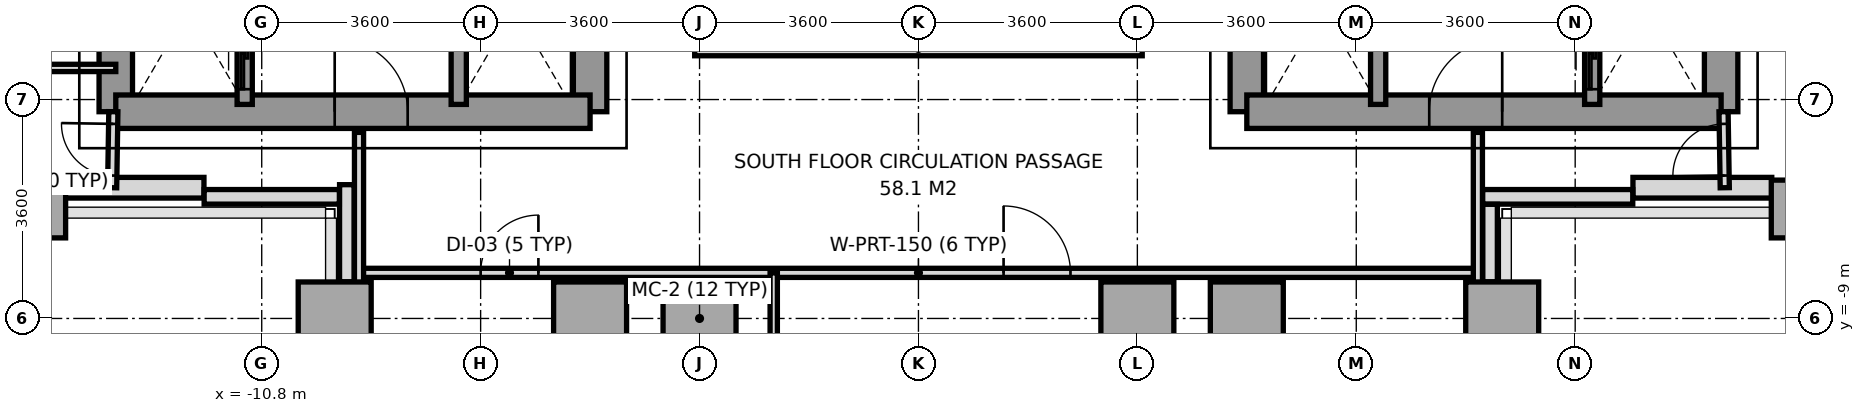
"""IFC4 building model, lengths in metres.
Left out: names, types, materials, properties, quantities, classifications, styles, units other than length and angle.
Written with IfcOpenShell. Run it as: python <this file> out.ifc"""

import sys

from ifc_helpers import new_model, si_unit, direction, frame, frame_2d, origin, origin_2d, place, context, subcontext, project, spatial, rectangle, extrude, source, transform, mapped, element, fill, save


model = new_model("IFC4")
c1 = context("Model", 3, precision=1e-05, world=origin(), true_north=direction((0.0, 1.0)))
c2 = subcontext(c1, "Body", "Model", "MODEL_VIEW")
j1 = project(units=[si_unit("LENGTHUNIT", "METRE"), si_unit("PLANEANGLEUNIT", "RADIAN")], contexts=[c1])
p1 = place(None, origin())
s1 = spatial("IfcSite", under=j1, at=p1, CompositionType="ELEMENT")
p2 = place(p1, origin())
s2 = spatial("IfcBuilding", under=s1, at=p2, CompositionType="ELEMENT")
p3 = place(p2, frame((0.0, 0.0, 34.0)))
s3 = spatial("IfcBuildingStorey", under=s2, at=p3, CompositionType="ELEMENT", Elevation=34.0)
m1 = source(origin(), c2, "Body", "SweptSolid", [
    extrude(rectangle(XDim=0.75, YDim=0.95, at=origin_2d()), origin(), (0.0, 0.0, 1.0), 3.2),
])
p4 = place(p3, frame((-14.4, -7.2, 0.0), z_axis=(0.0, 0.0, 1.0), x_axis=(1.0, 0.0, 0.0)))
e1 = element("IfcColumn", 1, at=p4, inside=s3, PredefinedType="COLUMN", context=c2, shape_type="MappedRepresentation", body=[
    mapped(m1, transform((0.0, 0.0, 0.0), x_axis=(1.0, 0.0, 0.0), y_axis=(0.0, 1.0, 0.0), z_axis=(0.0, 0.0, 1.0), scale=1.0)),
])
m2 = source(origin(), c2, "Body", "SweptSolid", [
    extrude(rectangle(XDim=1.2, YDim=1.2, at=origin_2d()), origin(), (0.0, 0.0, 1.0), 3.2),
])
for number, where, z_axis, x_axis in (
    (2, (-9.6, -9.0, 0.0), (0.0, 0.0, 1.0), (1.0, 0.0, 0.0)),
    (3, (-5.4, -9.0, 0.0), (0.0, 0.0, 1.0), (1.0, 0.0, 0.0)),
    (4, (-3.6, -9.0, 0.0), (0.0, 0.0, 1.0), (1.0, 0.0, 0.0)),
    (5, (3.6, -9.0, 0.0), (0.0, 0.0, 1.0), (1.0, 0.0, 0.0)),
    (6, (5.4, -9.0, 0.0), (0.0, 0.0, 1.0), (1.0, 0.0, 0.0)),
    (7, (9.6, -9.0, 0.0), (0.0, 0.0, 1.0), (1.0, 0.0, 0.0)),
):
    element("IfcColumn", number, at=place(p3, frame(where, z_axis=z_axis, x_axis=x_axis)), inside=s3, PredefinedType="COLUMN", context=c2, shape_type="MappedRepresentation", body=[
        mapped(m2, transform((0.0, 0.0, 0.0), x_axis=(1.0, 0.0, 0.0), y_axis=(0.0, 1.0, 0.0), z_axis=(0.0, 0.0, 1.0), scale=1.0)),
    ])
p5 = place(p3, frame((14.4, -7.2, 0.0), z_axis=(0.0, 0.0, 1.0), x_axis=(1.0, 0.0, 0.0)))
e8 = element("IfcColumn", 8, at=p5, inside=s3, PredefinedType="COLUMN", context=c2, shape_type="MappedRepresentation", body=[
    mapped(m1, transform((0.0, 0.0, 0.0), x_axis=(1.0, 0.0, 0.0), y_axis=(0.0, 1.0, 0.0), z_axis=(0.0, 0.0, 1.0), scale=1.0)),
])
for number, where, z_axis, x_axis in (
    (9, (-14.033, -6.85, 0.0), (0.0, 0.0, 1.0), (1.0, 0.0, 0.0)),
    (10, (11.75, -6.85, 0.0), (0.0, 0.0, 1.0), (1.0, 0.0, 0.0)),
):
    element("IfcWall", number, at=place(p3, frame(where, z_axis=z_axis, x_axis=x_axis)), inside=s3, PredefinedType="SOLIDWALL", context=c2, shape_type="SweptSolid", body=[
        extrude(rectangle(XDim=2.283, YDim=0.34, at=frame_2d((1.142, 0.0))), origin(), (0.0, 0.0, 1.0), 3.2),
    ])
p6 = place(p3, frame((11.747, -7.0, 0.0), z_axis=(0.0, 0.0, 1.0), x_axis=(-1.0, 0.0, 0.0)))
e11 = element("IfcWall", 11, at=p6, inside=s3, PredefinedType="PARAPET", context=c2, shape_type="SweptSolid", body=[
    extrude(rectangle(XDim=2.469, YDim=0.24, at=frame_2d((1.234, 0.0))), origin(), (0.0, 0.0, 1.0), 1.15),
])
p7 = place(p3, frame((9.4, -7.123, 0.0), z_axis=(0.0, 0.0, 1.0), x_axis=(0.0, -1.0, 0.0)))
e12 = element("IfcWall", 12, at=p7, inside=s3, PredefinedType="PARAPET", context=c2, shape_type="SweptSolid", body=[
    extrude(rectangle(XDim=1.274, YDim=0.24, at=frame_2d((0.637, 0.0))), origin(), (0.0, 0.0, 1.0), 1.15),
])
p8 = place(p3, frame((-9.4, -8.397, 0.0), z_axis=(0.0, 0.0, 1.0), x_axis=(0.0, 1.0, 0.0)))
e13 = element("IfcWall", 13, at=p8, inside=s3, PredefinedType="PARAPET", context=c2, shape_type="SweptSolid", body=[
    extrude(rectangle(XDim=1.597, YDim=0.24, at=frame_2d((0.798, 0.0))), origin(), (0.0, 0.0, 1.0), 1.15),
])
p9 = place(p3, frame((-9.523, -7.0, 0.0), z_axis=(0.0, 0.0, 1.0), x_axis=(-1.0, 0.0, 0.0)))
e14 = element("IfcWall", 14, at=p9, inside=s3, PredefinedType="PARAPET", context=c2, shape_type="SweptSolid", body=[
    extrude(rectangle(XDim=2.224, YDim=0.24, at=frame_2d((1.112, 0.0))), origin(), (0.0, 0.0, 1.0), 1.15),
])
p10 = place(p3, frame((-13.2, -5.6, 0.0), z_axis=(0.0, 0.0, 1.0), x_axis=(0.0, 1.0, 0.0)))
e15 = element("IfcWall", 15, at=p10, inside=s3, PredefinedType="SHEAR", context=c2, shape_type="SweptSolid", body=[
    extrude(rectangle(XDim=11.2, YDim=0.55, at=frame_2d((5.6, 0.0))), origin(), (0.0, 0.0, 1.0), 3.2),
])
p11 = place(p3, frame((-5.4, -5.6, 0.0), z_axis=(0.0, 0.0, 1.0), x_axis=(0.0, 1.0, 0.0)))
e16 = element("IfcWall", 16, at=p11, inside=s3, PredefinedType="SHEAR", context=c2, shape_type="SweptSolid", body=[
    extrude(rectangle(XDim=12.5, YDim=0.55, at=frame_2d((6.25, 0.0))), origin(), (0.0, 0.0, 1.0), 3.2),
])
p12 = place(p11, frame((4.55, 0.0, 0.0)))
e17 = element("IfcOpeningElement", 17, at=p12, cuts=e16, PredefinedType="OPENING", context=c2, shape_type="SweptSolid", body=[
    extrude(rectangle(XDim=1.2, YDim=2.2, at=frame_2d((0.6, 1.1))), frame((0.0, 0.285, 0.0), z_axis=(0.0, -1.0, 0.0), x_axis=(1.0, 0.0, 0.0)), (0.0, 0.0, 1.0), 0.57),
])
p13 = place(p11, frame((6.86, 0.0, 0.0)))
e18 = element("IfcOpeningElement", 18, at=p13, cuts=e16, PredefinedType="OPENING", context=c2, shape_type="SweptSolid", body=[
    extrude(rectangle(XDim=0.8, YDim=2.1, at=frame_2d((0.4, 1.05))), frame((0.0, 0.285, 0.0), z_axis=(0.0, -1.0, 0.0), x_axis=(1.0, 0.0, 0.0)), (0.0, 0.0, 1.0), 0.57),
])
p14 = place(p3, frame((-13.2, -5.6, 0.0), z_axis=(0.0, 0.0, 1.0), x_axis=(1.0, 0.0, 0.0)))
e19 = element("IfcWall", 19, at=p14, inside=s3, PredefinedType="SHEAR", context=c2, shape_type="SweptSolid", body=[
    extrude(rectangle(XDim=7.8, YDim=0.55, at=frame_2d((3.9, 0.0))), origin(), (0.0, 0.0, 1.0), 3.2),
])
p15 = place(p14, frame((3.6, 0.0, 0.0)))
e20 = element("IfcOpeningElement", 20, at=p15, cuts=e19, PredefinedType="OPENING", context=c2, shape_type="SweptSolid", body=[
    extrude(rectangle(XDim=1.2, YDim=2.2, at=frame_2d((0.6, 1.1))), frame((0.0, 0.285, 0.0), z_axis=(0.0, -1.0, 0.0), x_axis=(1.0, 0.0, 0.0)), (0.0, 0.0, 1.0), 0.57),
])
p16 = place(p3, frame((13.2, -5.6, 0.0), z_axis=(0.0, 0.0, 1.0), x_axis=(0.0, 1.0, 0.0)))
e21 = element("IfcWall", 21, at=p16, inside=s3, PredefinedType="SHEAR", context=c2, shape_type="SweptSolid", body=[
    extrude(rectangle(XDim=11.2, YDim=0.55, at=frame_2d((5.6, 0.0))), origin(), (0.0, 0.0, 1.0), 3.2),
])
p17 = place(p3, frame((5.4, -5.6, 0.0), z_axis=(0.0, 0.0, 1.0), x_axis=(0.0, 1.0, 0.0)))
e22 = element("IfcWall", 22, at=p17, inside=s3, PredefinedType="SHEAR", context=c2, shape_type="SweptSolid", body=[
    extrude(rectangle(XDim=12.5, YDim=0.55, at=frame_2d((6.25, 0.0))), origin(), (0.0, 0.0, 1.0), 3.2),
])
p18 = place(p17, frame((4.55, 0.0, 0.0)))
e23 = element("IfcOpeningElement", 23, at=p18, cuts=e22, PredefinedType="OPENING", context=c2, shape_type="SweptSolid", body=[
    extrude(rectangle(XDim=1.2, YDim=2.2, at=frame_2d((0.6, 1.1))), frame((0.0, 0.285, 0.0), z_axis=(0.0, -1.0, 0.0), x_axis=(1.0, 0.0, 0.0)), (0.0, 0.0, 1.0), 0.57),
])
p19 = place(p17, frame((6.86, 0.0, 0.0)))
e24 = element("IfcOpeningElement", 24, at=p19, cuts=e22, PredefinedType="OPENING", context=c2, shape_type="SweptSolid", body=[
    extrude(rectangle(XDim=0.8, YDim=2.1, at=frame_2d((0.4, 1.05))), frame((0.0, 0.285, 0.0), z_axis=(0.0, -1.0, 0.0), x_axis=(1.0, 0.0, 0.0)), (0.0, 0.0, 1.0), 0.57),
])
p20 = place(p3, frame((5.4, -5.6, 0.0), z_axis=(0.0, 0.0, 1.0), x_axis=(1.0, 0.0, 0.0)))
e25 = element("IfcWall", 25, at=p20, inside=s3, PredefinedType="SHEAR", context=c2, shape_type="SweptSolid", body=[
    extrude(rectangle(XDim=7.8, YDim=0.55, at=frame_2d((3.9, 0.0))), origin(), (0.0, 0.0, 1.0), 3.2),
])
p21 = place(p20, frame((3.0, 0.0, 0.0)))
e26 = element("IfcOpeningElement", 26, at=p21, cuts=e25, PredefinedType="OPENING", context=c2, shape_type="SweptSolid", body=[
    extrude(rectangle(XDim=1.2, YDim=2.2, at=frame_2d((0.6, 1.1))), frame((0.0, 0.285, 0.0), z_axis=(0.0, -1.0, 0.0), x_axis=(1.0, 0.0, 0.0)), (0.0, 0.0, 1.0), 0.57),
])
p22 = place(p3, frame((-11.08, -5.48, 0.0), z_axis=(0.0, 0.0, 1.0), x_axis=(0.0, 1.0, 0.0)))
e27 = element("IfcWall", 27, at=p22, inside=s3, PredefinedType="SOLIDWALL", context=c2, shape_type="SweptSolid", body=[
    extrude(rectangle(XDim=1.6, YDim=0.25, at=frame_2d((0.8, 0.0))), origin(), (0.0, 0.0, 1.0), 3.2),
])
p23 = place(p22, frame((0.25, 0.0, 0.0)))
e28 = element("IfcOpeningElement", 28, at=p23, cuts=e27, PredefinedType="OPENING", context=c2, shape_type="SweptSolid", body=[
    extrude(rectangle(XDim=1.1, YDim=2.2, at=frame_2d((0.55, 1.1))), frame((0.0, 0.135, 0.0), z_axis=(0.0, -1.0, 0.0), x_axis=(1.0, 0.0, 0.0)), (0.0, 0.0, 1.0), 0.27),
])
p24 = place(p3, frame((11.08, -5.48, 0.0), z_axis=(0.0, 0.0, 1.0), x_axis=(0.0, 1.0, 0.0)))
e29 = element("IfcWall", 29, at=p24, inside=s3, PredefinedType="SOLIDWALL", context=c2, shape_type="SweptSolid", body=[
    extrude(rectangle(XDim=1.6, YDim=0.25, at=frame_2d((0.8, 0.0))), origin(), (0.0, 0.0, 1.0), 3.2),
])
p25 = place(p24, frame((0.25, 0.0, 0.0)))
e30 = element("IfcOpeningElement", 30, at=p25, cuts=e29, PredefinedType="OPENING", context=c2, shape_type="SweptSolid", body=[
    extrude(rectangle(XDim=1.1, YDim=2.2, at=frame_2d((0.55, 1.1))), frame((0.0, 0.135, 0.0), z_axis=(0.0, -1.0, 0.0), x_axis=(1.0, 0.0, 0.0)), (0.0, 0.0, 1.0), 0.27),
])
for number, where, z_axis, x_axis in (
    (31, (-7.56, -5.48, 0.0), (0.0, 0.0, 1.0), (0.0, 1.0, 0.0)),
    (32, (7.56, -5.48, 0.0), (0.0, 0.0, 1.0), (0.0, 1.0, 0.0)),
):
    element("IfcWall", number, at=place(p3, frame(where, z_axis=z_axis, x_axis=x_axis)), inside=s3, PredefinedType="SOLIDWALL", context=c2, shape_type="SweptSolid", body=[
        extrude(rectangle(XDim=1.6, YDim=0.25, at=frame_2d((0.8, 0.0))), origin(), (0.0, 0.0, 1.0), 3.2),
    ])
p26 = place(p3, frame((-9.2, -8.25, 0.0), z_axis=(0.0, 0.0, 1.0), x_axis=(1.0, 0.0, 0.0)))
e33 = element("IfcWall", 33, at=p26, inside=s3, PredefinedType="PARTITIONING", context=c2, shape_type="SweptSolid", body=[
    extrude(rectangle(XDim=18.4, YDim=0.15, at=frame_2d((9.2, 0.0))), origin(), (0.0, 0.0, 1.0), 2.7),
])
p27 = place(p26, frame((2.0, 0.0, 0.0)))
e34 = element("IfcOpeningElement", 34, at=p27, cuts=e33, PredefinedType="OPENING", context=c2, shape_type="SweptSolid", body=[
    extrude(rectangle(XDim=0.95, YDim=2.15, at=frame_2d((0.475, 1.075))), frame((0.0, 0.085, 0.0), z_axis=(0.0, -1.0, 0.0), x_axis=(1.0, 0.0, 0.0)), (0.0, 0.0, 1.0), 0.17),
])
p28 = place(p26, frame((10.6, 0.0, 0.0)))
e35 = element("IfcOpeningElement", 35, at=p28, cuts=e33, PredefinedType="OPENING", context=c2, shape_type="SweptSolid", body=[
    extrude(rectangle(XDim=1.1, YDim=2.2, at=frame_2d((0.55, 1.1))), frame((0.0, 0.085, 0.0), z_axis=(0.0, -1.0, 0.0), x_axis=(1.0, 0.0, 0.0)), (0.0, 0.0, 1.0), 0.17),
])
for number, where, z_axis, x_axis in (
    (36, (-9.2, -15.68, 0.0), (0.0, 0.0, 1.0), (0.0, 1.0, 0.0)),
    (37, (9.2, -15.68, 0.0), (0.0, 0.0, 1.0), (0.0, 1.0, 0.0)),
):
    element("IfcWall", number, at=place(p3, frame(where, z_axis=z_axis, x_axis=x_axis)), inside=s3, PredefinedType="PARTITIONING", context=c2, shape_type="SweptSolid", body=[
        extrude(rectangle(XDim=9.74, YDim=0.15, at=frame_2d((4.87, 0.0))), origin(), (0.0, 0.0, 1.0), 2.71),
    ])
p29 = place(p3, frame((-2.38, -24.65, 0.0), z_axis=(0.0, 0.0, 1.0), x_axis=(0.0, 1.0, 0.0)))
e38 = element("IfcWall", 38, at=p29, inside=s3, PredefinedType="PARTITIONING", context=c2, shape_type="SweptSolid", body=[
    extrude(rectangle(XDim=16.4, YDim=0.12, at=frame_2d((8.2, 0.0))), origin(), (0.0, 0.0, 1.0), 2.71),
])
p30 = place(p3, frame((-13.26, -6.85, 0.0), z_axis=(0.0, 0.0, 1.0), x_axis=(0.016013571389, 0.999871774545, 0.0)))
e39 = element("IfcWall", 39, at=p30, inside=s3, PredefinedType="PARTITIONING", context=c2, shape_type="SweptSolid", body=[
    extrude(rectangle(XDim=1.25, YDim=0.15, at=frame_2d((0.625, 0.0))), origin(), (0.0, 0.0, 1.0), 3.2),
])
p31 = place(p30, frame((0.2, 0.0, 0.0)))
e40 = element("IfcOpeningElement", 40, at=p31, cuts=e39, PredefinedType="OPENING", context=c2, shape_type="SweptSolid", body=[
    extrude(rectangle(XDim=0.85, YDim=2.1, at=frame_2d((0.425, 1.05))), frame((0.0, 0.085, 0.0), z_axis=(0.0, -1.0, 0.0), x_axis=(1.0, 0.0, 0.0)), (0.0, 0.0, 1.0), 0.17),
])
p32 = place(p3, frame((-24.57, -4.88, 0.0), z_axis=(0.0, 0.0, 1.0), x_axis=(1.0, 0.0, 0.0)))
e41 = element("IfcWall", 41, at=p32, inside=s3, PredefinedType="PARTITIONING", context=c2, shape_type="SweptSolid", body=[
    extrude(rectangle(XDim=11.37, YDim=0.12, at=frame_2d((5.685, 0.0))), origin(), (0.0, 0.0, 1.0), 2.7),
])
p33 = place(p32, frame((2.2, 0.0, 0.0)))
e42 = element("IfcOpeningElement", 42, at=p33, cuts=e41, PredefinedType="OPENING", context=c2, shape_type="SweptSolid", body=[
    extrude(rectangle(XDim=0.95, YDim=2.15, at=frame_2d((0.475, 1.075))), frame((0.0, 0.07, 0.0), z_axis=(0.0, -1.0, 0.0), x_axis=(1.0, 0.0, 0.0)), (0.0, 0.0, 1.0), 0.14),
])
p34 = place(p3, frame((13.26, -6.85, 0.0), z_axis=(0.0, 0.0, 1.0), x_axis=(-0.016013571389, 0.999871774545, 0.0)))
e43 = element("IfcWall", 43, at=p34, inside=s3, PredefinedType="PARTITIONING", context=c2, shape_type="SweptSolid", body=[
    extrude(rectangle(XDim=1.25, YDim=0.15, at=frame_2d((0.625, 0.0))), origin(), (0.0, 0.0, 1.0), 3.2),
])
p35 = place(p34, frame((0.2, 0.0, 0.0)))
e44 = element("IfcOpeningElement", 44, at=p35, cuts=e43, PredefinedType="OPENING", context=c2, shape_type="SweptSolid", body=[
    extrude(rectangle(XDim=0.85, YDim=2.1, at=frame_2d((0.425, 1.05))), frame((0.0, 0.085, 0.0), z_axis=(0.0, -1.0, 0.0), x_axis=(1.0, 0.0, 0.0)), (0.0, 0.0, 1.0), 0.17),
])
p36 = place(p3, frame((-3.68, -4.56, 0.0), z_axis=(0.0, 0.0, 1.0), x_axis=(1.0, 0.0, 0.0)))
e45 = element("IfcWall", 45, at=p36, inside=s3, PredefinedType="PARAPET", context=c2, shape_type="SweptSolid", body=[
    extrude(rectangle(XDim=7.36, YDim=0.24, at=frame_2d((3.68, 0.0))), origin(), (0.0, 0.0, 1.0), 1.15),
])
m3 = source(origin(), c2, "Body", "SweptSolid", [
    extrude(rectangle(XDim=1.2, YDim=2.2, at=frame_2d((0.6, 1.1))), frame((0.0, 0.025, 0.0), z_axis=(0.0, -1.0, 0.0), x_axis=(1.0, 0.0, 0.0)), (0.0, 0.0, 1.0), 0.05),
])
p37 = place(p15, origin())
e46 = element("IfcDoor", 46, at=p37, inside=s3, OperationType="SINGLE_SWING_LEFT", PredefinedType="DOOR", context=c2, shape_type="MappedRepresentation", body=[
    mapped(m3, transform((0.0, 0.0, 0.0), x_axis=(1.0, 0.0, 0.0), y_axis=(0.0, 1.0, 0.0), z_axis=(0.0, 0.0, 1.0), scale=1.0)),
])
fill(e20, e46)
p38 = place(p21, origin())
e47 = element("IfcDoor", 47, at=p38, inside=s3, OperationType="SINGLE_SWING_RIGHT", PredefinedType="DOOR", context=c2, shape_type="MappedRepresentation", body=[
    mapped(m3, transform((0.0, 0.0, 0.0), x_axis=(1.0, 0.0, 0.0), y_axis=(0.0, 1.0, 0.0), z_axis=(0.0, 0.0, 1.0), scale=1.0)),
])
fill(e26, e47)
m4 = source(origin(), c2, "Body", "SweptSolid", [
    extrude(rectangle(XDim=1.1, YDim=2.2, at=frame_2d((0.55, 1.1))), frame((0.0, 0.025, 0.0), z_axis=(0.0, -1.0, 0.0), x_axis=(1.0, 0.0, 0.0)), (0.0, 0.0, 1.0), 0.05),
])
p39 = place(p23, origin())
e48 = element("IfcDoor", 48, at=p39, inside=s3, OperationType="SLIDING_TO_LEFT", PredefinedType="DOOR", context=c2, shape_type="MappedRepresentation", body=[
    mapped(m4, transform((0.0, 0.0, 0.0), x_axis=(1.0, 0.0, 0.0), y_axis=(0.0, 1.0, 0.0), z_axis=(0.0, 0.0, 1.0), scale=1.0)),
])
fill(e28, e48)
p40 = place(p25, origin())
e49 = element("IfcDoor", 49, at=p40, inside=s3, OperationType="SLIDING_TO_LEFT", PredefinedType="DOOR", context=c2, shape_type="MappedRepresentation", body=[
    mapped(m4, transform((0.0, 0.0, 0.0), x_axis=(1.0, 0.0, 0.0), y_axis=(0.0, 1.0, 0.0), z_axis=(0.0, 0.0, 1.0), scale=1.0)),
])
fill(e30, e49)
m5 = source(origin(), c2, "Body", "SweptSolid", [
    extrude(rectangle(XDim=0.95, YDim=2.15, at=frame_2d((0.475, 1.075))), frame((0.0, 0.025, 0.0), z_axis=(0.0, -1.0, 0.0), x_axis=(1.0, 0.0, 0.0)), (0.0, 0.0, 1.0), 0.05),
])
p41 = place(p27, origin())
e50 = element("IfcDoor", 50, at=p41, inside=s3, OperationType="SINGLE_SWING_RIGHT", PredefinedType="DOOR", context=c2, shape_type="MappedRepresentation", body=[
    mapped(m5, transform((0.0, 0.0, 0.0), x_axis=(1.0, 0.0, 0.0), y_axis=(0.0, 1.0, 0.0), z_axis=(0.0, 0.0, 1.0), scale=1.0)),
])
fill(e34, e50)
p42 = place(p28, origin())
e51 = element("IfcDoor", 51, at=p42, inside=s3, OperationType="SINGLE_SWING_LEFT", PredefinedType="DOOR", context=c2, shape_type="MappedRepresentation", body=[
    mapped(m4, transform((0.0, 0.0, 0.0), x_axis=(1.0, 0.0, 0.0), y_axis=(0.0, 1.0, 0.0), z_axis=(0.0, 0.0, 1.0), scale=1.0)),
])
fill(e35, e51)
m6 = source(origin(), c2, "Body", "SweptSolid", [
    extrude(rectangle(XDim=0.85, YDim=2.1, at=frame_2d((0.425, 1.05))), frame((0.0, 0.025, 0.0), z_axis=(0.0, -1.0, 0.0), x_axis=(1.0, 0.0, 0.0)), (0.0, 0.0, 1.0), 0.05),
])
p43 = place(p31, origin())
e52 = element("IfcDoor", 52, at=p43, inside=s3, OperationType="SINGLE_SWING_RIGHT", PredefinedType="DOOR", context=c2, shape_type="MappedRepresentation", body=[
    mapped(m6, transform((0.0, 0.0, 0.0), x_axis=(1.0, 0.0, 0.0), y_axis=(0.0, 1.0, 0.0), z_axis=(0.0, 0.0, 1.0), scale=1.0)),
])
fill(e40, e52)
p44 = place(p35, origin())
e53 = element("IfcDoor", 53, at=p44, inside=s3, OperationType="SINGLE_SWING_LEFT", PredefinedType="DOOR", context=c2, shape_type="MappedRepresentation", body=[
    mapped(m6, transform((0.0, 0.0, 0.0), x_axis=(1.0, 0.0, 0.0), y_axis=(0.0, 1.0, 0.0), z_axis=(0.0, 0.0, 1.0), scale=1.0)),
])
fill(e44, e53)
save(model, sys.argv[1])
